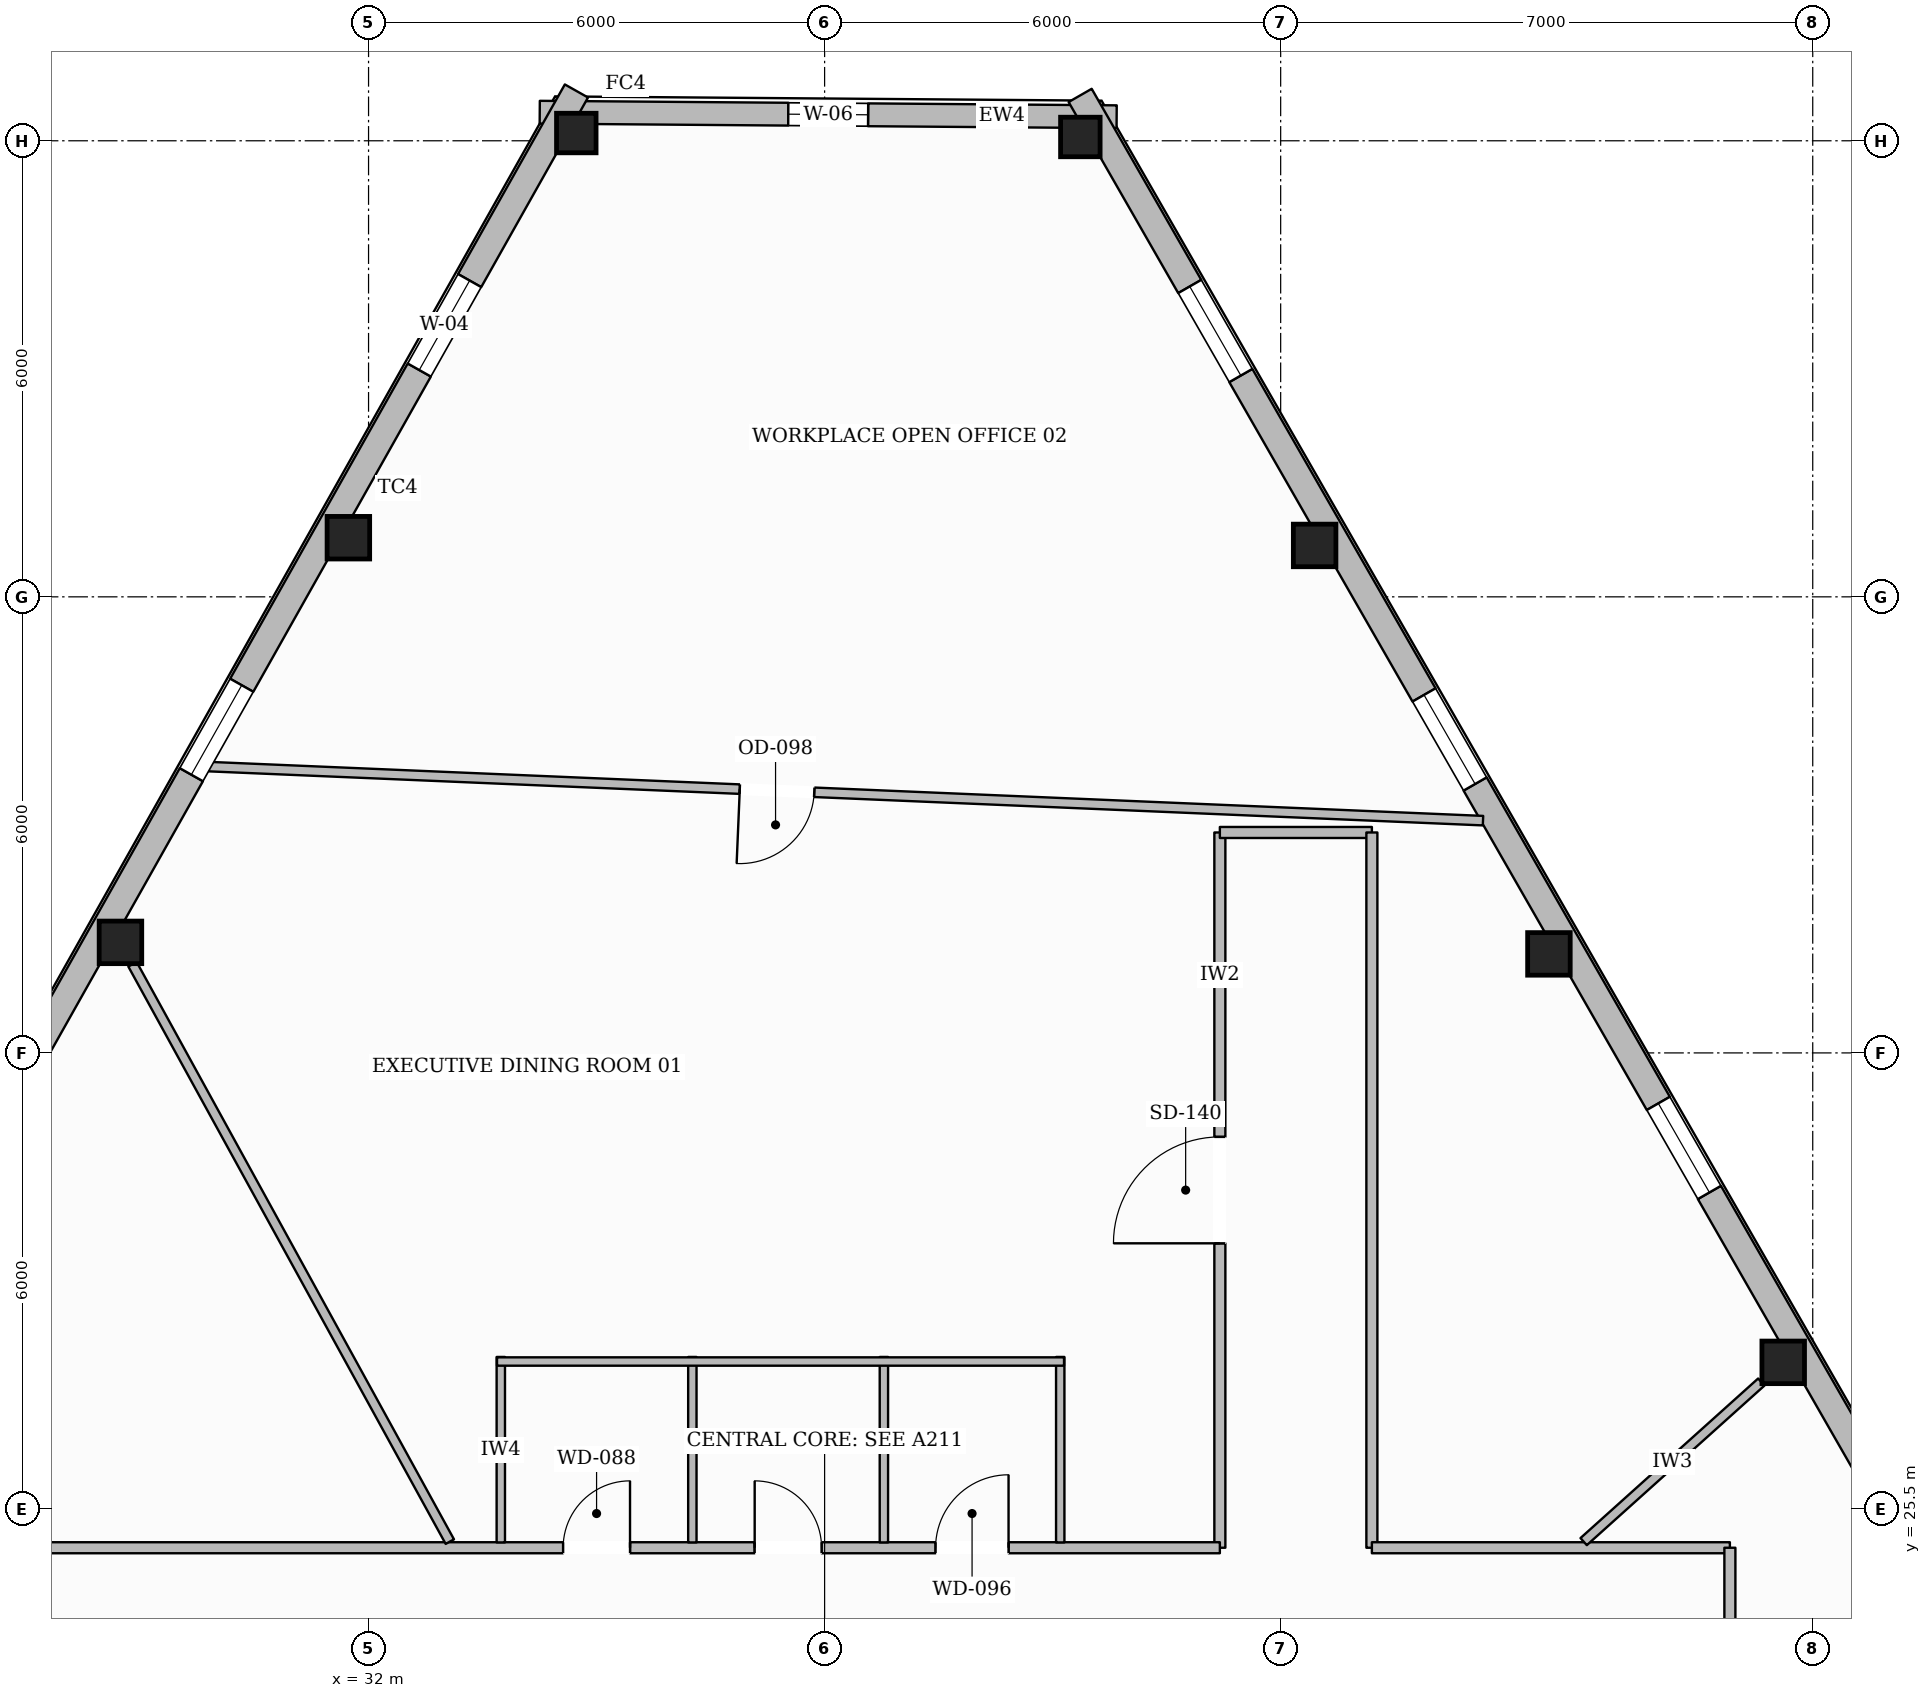
"""IFC4 building model, lengths in metres.
Left out: names, types, materials, properties, quantities, classifications, styles, units other than length and angle.
Written with IfcOpenShell. Run it as: python <this file> out.ifc"""

import sys

from ifc_helpers import new_model, si_unit, direction, frame, frame_2d, origin, origin_2d, place, context, subcontext, project, spatial, rectangle, hollow_rectangle, extrude, element, fill, save


model = new_model("IFC4")
c1 = context("Model", 3, precision=1e-05, world=origin(), true_north=direction((0.0, 1.0)))
c2 = subcontext(c1, "Body", "Model", "MODEL_VIEW")
j1 = project(units=[si_unit("LENGTHUNIT", "METRE"), si_unit("PLANEANGLEUNIT", "RADIAN")], contexts=[c1])
p1 = place(None, origin())
s1 = spatial("IfcSite", under=j1, at=p1, CompositionType="ELEMENT")
p2 = place(p1, origin())
s2 = spatial("IfcBuilding", under=s1, at=p2, CompositionType="ELEMENT")
p3 = place(p2, frame((0.0, 0.0, 243.35)))
s3 = spatial("IfcBuildingStorey", under=s2, at=p3, CompositionType="ELEMENT", Elevation=243.35)
p4 = place(p3, frame((34.733, 43.602, 0.0), z_axis=(0.0, 0.0, 1.0), x_axis=(1.0, 0.0, 0.0)))
e1 = element("IfcColumn", 1, at=p4, inside=s3, PredefinedType="COLUMN", context=c2, shape_type="SweptSolid", body=[
    extrude(hollow_rectangle(XDim=0.52, YDim=0.52, WallThickness=0.024, at=origin_2d()), origin(), (0.0, 0.0, 1.0), 3.61),
])
for number, where, z_axis, x_axis in (
    (2, (31.735, 38.278, 0.0), (0.0, 0.0, 1.0), (1.0, 0.0, 0.0)),
    (3, (28.736, 32.954, 0.0), (0.0, 0.0, 1.0), (1.0, 0.0, 0.0)),
    (4, (50.612, 27.429, 0.0), (0.0, 0.0, 1.0), (1.0, 0.0, 0.0)),
    (5, (47.529, 32.802, 0.0), (0.0, 0.0, 1.0), (1.0, 0.0, 0.0)),
    (6, (44.447, 38.176, 0.0), (0.0, 0.0, 1.0), (1.0, 0.0, 0.0)),
):
    element("IfcColumn", number, at=place(p3, frame(where, z_axis=z_axis, x_axis=x_axis)), inside=s3, PredefinedType="COLUMN", context=c2, shape_type="SweptSolid", body=[
        extrude(hollow_rectangle(XDim=0.56, YDim=0.56, WallThickness=0.025, at=origin_2d()), origin(), (0.0, 0.0, 1.0), 3.61),
    ])
p5 = place(p3, frame((41.365, 43.55, 0.0), z_axis=(0.0, 0.0, 1.0), x_axis=(1.0, 0.0, 0.0)))
e7 = element("IfcColumn", 7, at=p5, inside=s3, PredefinedType="COLUMN", context=c2, shape_type="SweptSolid", body=[
    extrude(hollow_rectangle(XDim=0.52, YDim=0.52, WallThickness=0.024, at=origin_2d()), origin(), (0.0, 0.0, 1.0), 3.61),
])
p6 = place(p3, frame((34.252, 43.875, 0.0), z_axis=(0.0, 0.0, 1.0), x_axis=(0.999969452401, -0.007816282068, 0.0)))
e8 = element("IfcWall", 8, at=p6, inside=s3, PredefinedType="STANDARD", context=c2, shape_type="SweptSolid", body=[
    extrude(rectangle(XDim=7.59, YDim=0.3, at=frame_2d((3.795, 0.0))), origin(), (0.0, 0.0, 1.0), 3.196),
])
p7 = place(p6, frame((3.27, 0.0, 0.65)))
e9 = element("IfcOpeningElement", 9, at=p7, cuts=e8, PredefinedType="OPENING", context=c2, shape_type="SweptSolid", body=[
    extrude(rectangle(XDim=1.05, YDim=1.7, at=frame_2d((0.525, 0.85))), frame((0.0, 0.16, 0.0), z_axis=(0.0, -1.0, 0.0), x_axis=(1.0, 0.0, 0.0)), (0.0, 0.0, 1.0), 0.32),
])
p8 = place(p3, frame((16.275, 11.379, 0.0), z_axis=(0.0, 0.0, 1.0), x_axis=(0.490746172412, 0.871302584791, 0.0)))
e10 = element("IfcWall", 10, at=p8, inside=s3, PredefinedType="STANDARD", context=c2, shape_type="SweptSolid", body=[
    extrude(rectangle(XDim=37.617, YDim=0.35, at=frame_2d((18.809, 0.0))), origin(), (0.0, 0.0, 1.0), 3.196),
])
p9 = place(p8, frame((33.404, 0.0, 0.65)))
e11 = element("IfcOpeningElement", 11, at=p9, cuts=e10, PredefinedType="OPENING", context=c2, shape_type="SweptSolid", body=[
    extrude(rectangle(XDim=1.35, YDim=1.75, at=frame_2d((0.675, 0.875))), frame((0.0, 0.185, 0.0), z_axis=(0.0, -1.0, 0.0), x_axis=(1.0, 0.0, 0.0)), (0.0, 0.0, 1.0), 0.37),
])
p10 = place(p8, frame((27.294, 0.0, 0.65)))
e12 = element("IfcOpeningElement", 12, at=p10, cuts=e10, PredefinedType="OPENING", context=c2, shape_type="SweptSolid", body=[
    extrude(rectangle(XDim=1.35, YDim=1.75, at=frame_2d((0.675, 0.875))), frame((0.0, 0.185, 0.0), z_axis=(0.0, -1.0, 0.0), x_axis=(1.0, 0.0, 0.0)), (0.0, 0.0, 1.0), 0.37),
])
p11 = place(p8, frame((15.073, 0.0, 0.65)))
e13 = element("IfcOpeningElement", 13, at=p11, cuts=e10, PredefinedType="OPENING", context=c2, shape_type="SweptSolid", body=[
    extrude(rectangle(XDim=1.35, YDim=1.75, at=frame_2d((0.675, 0.875))), frame((0.0, 0.185, 0.0), z_axis=(0.0, -1.0, 0.0), x_axis=(1.0, 0.0, 0.0)), (0.0, 0.0, 1.0), 0.37),
])
p12 = place(p8, frame((8.963, 0.0, 0.65)))
e14 = element("IfcOpeningElement", 14, at=p12, cuts=e10, PredefinedType="OPENING", context=c2, shape_type="SweptSolid", body=[
    extrude(rectangle(XDim=1.35, YDim=1.75, at=frame_2d((0.675, 0.875))), frame((0.0, 0.185, 0.0), z_axis=(0.0, -1.0, 0.0), x_axis=(1.0, 0.0, 0.0)), (0.0, 0.0, 1.0), 0.37),
])
p13 = place(p8, frame((2.853, 0.0, 0.65)))
e15 = element("IfcOpeningElement", 15, at=p13, cuts=e10, PredefinedType="OPENING", context=c2, shape_type="SweptSolid", body=[
    extrude(rectangle(XDim=1.35, YDim=1.75, at=frame_2d((0.675, 0.875))), frame((0.0, 0.185, 0.0), z_axis=(0.0, -1.0, 0.0), x_axis=(1.0, 0.0, 0.0)), (0.0, 0.0, 1.0), 0.37),
])
p14 = place(p3, frame((41.362, 44.097, 0.0), z_axis=(0.0, 0.0, 1.0), x_axis=(0.497556414716, -0.867431619308, 0.0)))
e16 = element("IfcWall", 16, at=p14, inside=s3, PredefinedType="STANDARD", context=c2, shape_type="SweptSolid", body=[
    extrude(rectangle(XDim=38.118, YDim=0.35, at=frame_2d((19.059, 0.0))), origin(), (0.0, 0.0, 1.0), 3.196),
])
p15 = place(p14, frame((33.873, 0.0, 0.65)))
e17 = element("IfcOpeningElement", 17, at=p15, cuts=e16, PredefinedType="OPENING", context=c2, shape_type="SweptSolid", body=[
    extrude(rectangle(XDim=1.35, YDim=1.75, at=frame_2d((0.675, 0.875))), frame((0.0, 0.185, 0.0), z_axis=(0.0, -1.0, 0.0), x_axis=(1.0, 0.0, 0.0)), (0.0, 0.0, 1.0), 0.37),
])
p16 = place(p14, frame((27.678, 0.0, 0.65)))
e18 = element("IfcOpeningElement", 18, at=p16, cuts=e16, PredefinedType="OPENING", context=c2, shape_type="SweptSolid", body=[
    extrude(rectangle(XDim=1.35, YDim=1.75, at=frame_2d((0.675, 0.875))), frame((0.0, 0.185, 0.0), z_axis=(0.0, -1.0, 0.0), x_axis=(1.0, 0.0, 0.0)), (0.0, 0.0, 1.0), 0.37),
])
p17 = place(p14, frame((15.288, 0.0, 0.65)))
e19 = element("IfcOpeningElement", 19, at=p17, cuts=e16, PredefinedType="OPENING", context=c2, shape_type="SweptSolid", body=[
    extrude(rectangle(XDim=1.35, YDim=1.75, at=frame_2d((0.675, 0.875))), frame((0.0, 0.185, 0.0), z_axis=(0.0, -1.0, 0.0), x_axis=(1.0, 0.0, 0.0)), (0.0, 0.0, 1.0), 0.37),
])
p18 = place(p14, frame((9.093, 0.0, 0.65)))
e20 = element("IfcOpeningElement", 20, at=p18, cuts=e16, PredefinedType="OPENING", context=c2, shape_type="SweptSolid", body=[
    extrude(rectangle(XDim=1.35, YDim=1.75, at=frame_2d((0.675, 0.875))), frame((0.0, 0.185, 0.0), z_axis=(0.0, -1.0, 0.0), x_axis=(1.0, 0.0, 0.0)), (0.0, 0.0, 1.0), 0.37),
])
p19 = place(p14, frame((2.898, 0.0, 0.65)))
e21 = element("IfcOpeningElement", 21, at=p19, cuts=e16, PredefinedType="OPENING", context=c2, shape_type="SweptSolid", body=[
    extrude(rectangle(XDim=1.35, YDim=1.75, at=frame_2d((0.675, 0.875))), frame((0.0, 0.185, 0.0), z_axis=(0.0, -1.0, 0.0), x_axis=(1.0, 0.0, 0.0)), (0.0, 0.0, 1.0), 0.37),
])
p20 = place(p3, frame((43.2, 24.99, 0.0), z_axis=(0.0, 0.0, 1.0), x_axis=(0.0, 1.0, 0.0)))
e22 = element("IfcWall", 22, at=p20, inside=s3, PredefinedType="PARTITIONING", context=c2, shape_type="SweptSolid", body=[
    extrude(rectangle(XDim=9.41, YDim=0.145, at=frame_2d((4.705, 0.0))), origin(), (0.0, 0.0, 1.0), 3.61),
])
p21 = place(p20, frame((4.005, 0.0, 0.0)))
e23 = element("IfcOpeningElement", 23, at=p21, cuts=e22, PredefinedType="OPENING", context=c2, shape_type="SweptSolid", body=[
    extrude(rectangle(XDim=1.4, YDim=2.2, at=frame_2d((0.7, 1.1))), frame((0.0, 0.083, 0.0), z_axis=(0.0, -1.0, 0.0), x_axis=(1.0, 0.0, 0.0)), (0.0, 0.0, 1.0), 0.165),
])
p22 = place(p3, frame((43.2, 34.4, 0.0), z_axis=(0.0, 0.0, 1.0), x_axis=(1.0, 0.0, 0.0)))
e24 = element("IfcWall", 24, at=p22, inside=s3, PredefinedType="PARTITIONING", context=c2, shape_type="SweptSolid", body=[
    extrude(rectangle(XDim=2.0, YDim=0.145, at=frame_2d((1.0, 0.0))), origin(), (0.0, 0.0, 1.0), 3.61),
])
p23 = place(p3, frame((45.2, 34.4, 0.0), z_axis=(0.0, 0.0, 1.0), x_axis=(0.0, -1.0, 0.0)))
e25 = element("IfcWall", 25, at=p23, inside=s3, PredefinedType="PARTITIONING", context=c2, shape_type="SweptSolid", body=[
    extrude(rectangle(XDim=9.41, YDim=0.145, at=frame_2d((4.705, 0.0))), origin(), (0.0, 0.0, 1.0), 3.61),
])
p24 = place(p3, frame((45.2, 24.99, 0.0), z_axis=(0.0, 0.0, 1.0), x_axis=(1.0, 0.0, 0.0)))
e26 = element("IfcWall", 26, at=p24, inside=s3, PredefinedType="PARTITIONING", context=c2, shape_type="SweptSolid", body=[
    extrude(rectangle(XDim=4.71, YDim=0.145, at=frame_2d((2.355, 0.0))), origin(), (0.0, 0.0, 1.0), 3.61),
])
p25 = place(p3, frame((49.91, 24.99, 0.0), z_axis=(0.0, 0.0, 1.0), x_axis=(0.0, -1.0, 0.0)))
e27 = element("IfcWall", 27, at=p25, inside=s3, PredefinedType="PARTITIONING", context=c2, shape_type="SweptSolid", body=[
    extrude(rectangle(XDim=7.34, YDim=0.145, at=frame_2d((3.67, 0.0))), origin(), (0.0, 0.0, 1.0), 3.349),
])
p26 = place(p25, frame((2.97, 0.0, 0.0)))
e28 = element("IfcOpeningElement", 28, at=p26, cuts=e27, PredefinedType="OPENING", context=c2, shape_type="SweptSolid", body=[
    extrude(rectangle(XDim=1.4, YDim=2.2, at=frame_2d((0.7, 1.1))), frame((0.0, 0.083, 0.0), z_axis=(0.0, -1.0, 0.0), x_axis=(1.0, 0.0, 0.0)), (0.0, 0.0, 1.0), 0.165),
])
p27 = place(p3, frame((26.09, 24.99, 0.0), z_axis=(0.0, 0.0, 1.0), x_axis=(1.0, 0.0, 0.0)))
e29 = element("IfcWall", 29, at=p27, inside=s3, PredefinedType="PARTITIONING", context=c2, shape_type="SweptSolid", body=[
    extrude(rectangle(XDim=17.11, YDim=0.145, at=frame_2d((8.555, 0.0))), origin(), (0.0, 0.0, 1.0), 3.61),
])
p28 = place(p27, frame((8.47, 0.0, 0.0)))
e30 = element("IfcOpeningElement", 30, at=p28, cuts=e29, PredefinedType="OPENING", context=c2, shape_type="SweptSolid", body=[
    extrude(rectangle(XDim=0.88, YDim=2.1, at=frame_2d((0.44, 1.05))), frame((0.0, 0.083, 0.0), z_axis=(0.0, -1.0, 0.0), x_axis=(1.0, 0.0, 0.0)), (0.0, 0.0, 1.0), 0.165),
])
p29 = place(p27, frame((10.99, 0.0, 0.0)))
e31 = element("IfcOpeningElement", 31, at=p29, cuts=e29, PredefinedType="OPENING", context=c2, shape_type="SweptSolid", body=[
    extrude(rectangle(XDim=0.88, YDim=2.1, at=frame_2d((0.44, 1.05))), frame((0.0, 0.083, 0.0), z_axis=(0.0, -1.0, 0.0), x_axis=(1.0, 0.0, 0.0)), (0.0, 0.0, 1.0), 0.165),
])
p30 = place(p27, frame((13.37, 0.0, 0.0)))
e32 = element("IfcOpeningElement", 32, at=p30, cuts=e29, PredefinedType="OPENING", context=c2, shape_type="SweptSolid", body=[
    extrude(rectangle(XDim=0.96, YDim=2.1, at=frame_2d((0.48, 1.05))), frame((0.0, 0.083, 0.0), z_axis=(0.0, -1.0, 0.0), x_axis=(1.0, 0.0, 0.0)), (0.0, 0.0, 1.0), 0.165),
])
for number, where, z_axis, x_axis in (
    (33, (33.74, 25.06, 0.0), (0.0, 0.0, 1.0), (0.0, 1.0, 0.0)),
    (34, (36.26, 25.06, 0.0), (0.0, 0.0, 1.0), (0.0, 1.0, 0.0)),
    (35, (38.78, 25.06, 0.0), (0.0, 0.0, 1.0), (0.0, 1.0, 0.0)),
    (36, (41.1, 25.06, 0.0), (0.0, 0.0, 1.0), (0.0, 1.0, 0.0)),
):
    element("IfcWall", number, at=place(p3, frame(where, z_axis=z_axis, x_axis=x_axis)), inside=s3, PredefinedType="PLUMBINGWALL", context=c2, shape_type="SweptSolid", body=[
        extrude(rectangle(XDim=2.44, YDim=0.11, at=frame_2d((1.22, 0.0))), origin(), (0.0, 0.0, 1.0), 3.61),
    ])
p31 = place(p3, frame((33.69, 27.44, 0.0), z_axis=(0.0, 0.0, 1.0), x_axis=(1.0, 0.0, 0.0)))
e37 = element("IfcWall", 37, at=p31, inside=s3, PredefinedType="PLUMBINGWALL", context=c2, shape_type="SweptSolid", body=[
    extrude(rectangle(XDim=7.46, YDim=0.11, at=frame_2d((3.73, 0.0))), origin(), (0.0, 0.0, 1.0), 3.61),
])
p32 = place(p3, frame((47.986, 25.071, 0.0), z_axis=(0.0, 0.0, 1.0), x_axis=(0.743935182086, 0.66825178253, 0.0)))
e38 = element("IfcWall", 38, at=p32, inside=s3, PredefinedType="PARTITIONING", context=c2, shape_type="SweptSolid", body=[
    extrude(rectangle(XDim=3.142, YDim=0.125, at=frame_2d((1.571, 0.0))), origin(), (0.0, 0.0, 1.0), 3.61),
])
p33 = place(p3, frame((33.069, 25.071, 0.0), z_axis=(0.0, 0.0, 1.0), x_axis=(-0.481689502038, 0.876341955875, 0.0)))
e39 = element("IfcWall", 39, at=p33, inside=s3, PredefinedType="PARTITIONING", context=c2, shape_type="SweptSolid", body=[
    extrude(rectangle(XDim=8.667, YDim=0.125, at=frame_2d((4.334, 0.0))), origin(), (0.0, 0.0, 1.0), 3.246),
])
p34 = place(p3, frame((46.662, 34.555, 0.0), z_axis=(0.0, 0.0, 1.0), x_axis=(-0.999101054497, 0.04239201462, 0.0)))
e40 = element("IfcWall", 40, at=p34, inside=s3, PredefinedType="PARTITIONING", context=c2, shape_type="SweptSolid", body=[
    extrude(rectangle(XDim=16.776, YDim=0.125, at=frame_2d((8.388, 0.0))), origin(), (0.0, 0.0, 1.0), 3.61),
])
p35 = place(p34, frame((8.807, 0.0, 0.0)))
e41 = element("IfcOpeningElement", 41, at=p35, cuts=e40, PredefinedType="OPENING", context=c2, shape_type="SweptSolid", body=[
    extrude(rectangle(XDim=0.98, YDim=2.15, at=frame_2d((0.49, 1.075))), frame((0.0, 0.073, 0.0), z_axis=(0.0, -1.0, 0.0), x_axis=(1.0, 0.0, 0.0)), (0.0, 0.0, 1.0), 0.145),
])
p36 = place(p9, origin())
e42 = element("IfcWindow", 42, at=p36, inside=s3, PartitioningType="SINGLE_PANEL", PredefinedType="WINDOW", context=c2, shape_type="SweptSolid", body=[
    extrude(rectangle(XDim=1.35, YDim=1.75, at=frame_2d((0.675, 0.875))), frame((0.0, 0.03, 0.0), z_axis=(0.0, -1.0, 0.0), x_axis=(1.0, 0.0, 0.0)), (0.0, 0.0, 1.0), 0.06),
])
fill(e11, e42)
p37 = place(p10, origin())
e43 = element("IfcWindow", 43, at=p37, inside=s3, PartitioningType="SINGLE_PANEL", PredefinedType="WINDOW", context=c2, shape_type="SweptSolid", body=[
    extrude(rectangle(XDim=1.35, YDim=1.75, at=frame_2d((0.675, 0.875))), frame((0.0, 0.03, 0.0), z_axis=(0.0, -1.0, 0.0), x_axis=(1.0, 0.0, 0.0)), (0.0, 0.0, 1.0), 0.06),
])
fill(e12, e43)
p38 = place(p17, origin())
e44 = element("IfcWindow", 44, at=p38, inside=s3, PartitioningType="SINGLE_PANEL", PredefinedType="WINDOW", context=c2, shape_type="SweptSolid", body=[
    extrude(rectangle(XDim=1.35, YDim=1.75, at=frame_2d((0.675, 0.875))), frame((0.0, 0.03, 0.0), z_axis=(0.0, -1.0, 0.0), x_axis=(1.0, 0.0, 0.0)), (0.0, 0.0, 1.0), 0.06),
])
fill(e19, e44)
p39 = place(p18, origin())
e45 = element("IfcWindow", 45, at=p39, inside=s3, PartitioningType="SINGLE_PANEL", PredefinedType="WINDOW", context=c2, shape_type="SweptSolid", body=[
    extrude(rectangle(XDim=1.35, YDim=1.75, at=frame_2d((0.675, 0.875))), frame((0.0, 0.03, 0.0), z_axis=(0.0, -1.0, 0.0), x_axis=(1.0, 0.0, 0.0)), (0.0, 0.0, 1.0), 0.06),
])
fill(e20, e45)
p40 = place(p19, origin())
e46 = element("IfcWindow", 46, at=p40, inside=s3, PartitioningType="SINGLE_PANEL", PredefinedType="WINDOW", context=c2, shape_type="SweptSolid", body=[
    extrude(rectangle(XDim=1.35, YDim=1.75, at=frame_2d((0.675, 0.875))), frame((0.0, 0.03, 0.0), z_axis=(0.0, -1.0, 0.0), x_axis=(1.0, 0.0, 0.0)), (0.0, 0.0, 1.0), 0.06),
])
fill(e21, e46)
p41 = place(p7, origin())
e47 = element("IfcWindow", 47, at=p41, inside=s3, PartitioningType="SINGLE_PANEL", PredefinedType="WINDOW", context=c2, shape_type="SweptSolid", body=[
    extrude(rectangle(XDim=1.05, YDim=1.7, at=frame_2d((0.525, 0.85))), frame((0.0, 0.03, 0.0), z_axis=(0.0, -1.0, 0.0), x_axis=(1.0, 0.0, 0.0)), (0.0, 0.0, 1.0), 0.06),
])
fill(e9, e47)
p42 = place(p28, origin())
e48 = element("IfcDoor", 48, at=p42, inside=s3, OperationType="SINGLE_SWING_RIGHT", PredefinedType="DOOR", context=c2, shape_type="SweptSolid", body=[
    extrude(rectangle(XDim=0.88, YDim=2.1, at=frame_2d((0.44, 1.05))), frame((0.0, 0.025, 0.0), z_axis=(0.0, -1.0, 0.0), x_axis=(1.0, 0.0, 0.0)), (0.0, 0.0, 1.0), 0.05),
])
fill(e30, e48)
p43 = place(p29, origin())
e49 = element("IfcDoor", 49, at=p43, inside=s3, OperationType="SINGLE_SWING_LEFT", PredefinedType="DOOR", context=c2, shape_type="SweptSolid", body=[
    extrude(rectangle(XDim=0.88, YDim=2.1, at=frame_2d((0.44, 1.05))), frame((0.0, 0.025, 0.0), z_axis=(0.0, -1.0, 0.0), x_axis=(1.0, 0.0, 0.0)), (0.0, 0.0, 1.0), 0.05),
])
fill(e31, e49)
p44 = place(p30, origin())
e50 = element("IfcDoor", 50, at=p44, inside=s3, OperationType="SINGLE_SWING_RIGHT", PredefinedType="DOOR", context=c2, shape_type="SweptSolid", body=[
    extrude(rectangle(XDim=0.96, YDim=2.1, at=frame_2d((0.48, 1.05))), frame((0.0, 0.025, 0.0), z_axis=(0.0, -1.0, 0.0), x_axis=(1.0, 0.0, 0.0)), (0.0, 0.0, 1.0), 0.05),
])
fill(e32, e50)
p45 = place(p21, origin())
e51 = element("IfcDoor", 51, at=p45, inside=s3, OperationType="SINGLE_SWING_LEFT", PredefinedType="DOOR", context=c2, shape_type="SweptSolid", body=[
    extrude(rectangle(XDim=1.4, YDim=2.2, at=frame_2d((0.7, 1.1))), frame((0.0, 0.025, 0.0), z_axis=(0.0, -1.0, 0.0), x_axis=(1.0, 0.0, 0.0)), (0.0, 0.0, 1.0), 0.05),
])
fill(e23, e51)
p46 = place(p35, origin())
e52 = element("IfcDoor", 52, at=p46, inside=s3, OperationType="SINGLE_SWING_RIGHT", PredefinedType="DOOR", context=c2, shape_type="SweptSolid", body=[
    extrude(rectangle(XDim=0.98, YDim=2.15, at=frame_2d((0.49, 1.075))), frame((0.0, 0.025, 0.0), z_axis=(0.0, -1.0, 0.0), x_axis=(1.0, 0.0, 0.0)), (0.0, 0.0, 1.0), 0.05),
])
fill(e41, e52)
save(model, sys.argv[1])
